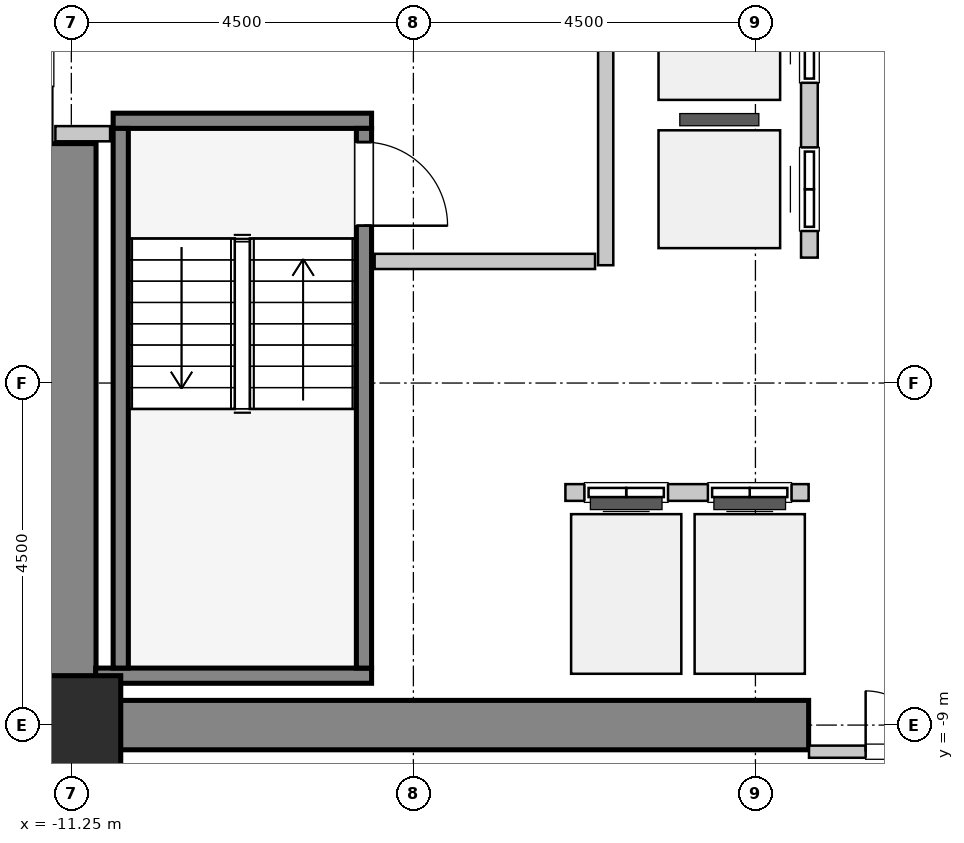
"""IFC4 building model, lengths in metres.
Left out: names, types, materials, properties, quantities, classifications, styles, units other than length and angle.
Written with IfcOpenShell. Run it as: python <this file> out.ifc"""

import sys

from ifc_helpers import new_model, si_unit, direction, frame, frame_2d, origin, origin_2d, place, context, subcontext, project, spatial, rectangle, hollow_rectangle, extrude, source, transform, mapped, element, fill, save


model = new_model("IFC4")
c1 = context("Model", 3, precision=1e-05, world=origin(), true_north=direction((0.0, 1.0)))
c2 = subcontext(c1, "Body", "Model", "MODEL_VIEW")
j1 = project(units=[si_unit("LENGTHUNIT", "METRE"), si_unit("PLANEANGLEUNIT", "RADIAN")], contexts=[c1])
p1 = place(None, origin())
s1 = spatial("IfcSite", under=j1, at=p1, CompositionType="ELEMENT")
p2 = place(p1, origin())
s2 = spatial("IfcBuilding", under=s1, at=p2, CompositionType="ELEMENT")
p3 = place(p2, origin())
s3 = spatial("IfcBuildingStorey", under=s2, at=p3, CompositionType="ELEMENT", Elevation=0.0)
m1 = source(origin(), c2, "Body", "SweptSolid", [
    extrude(rectangle(XDim=10.025, YDim=0.65, at=frame_2d((5.012, 0.0))), origin(), (0.0, 0.0, 1.0), 6.0),
])
p4 = place(p3, frame((-11.575, -9.0, 0.0), z_axis=(0.0, 0.0, 1.0), x_axis=(1.0, 0.0, 0.0)))
e1 = element("IfcWall", 1, at=p4, inside=s3, PredefinedType="SHEAR", context=c2, shape_type="MappedRepresentation", body=[
    mapped(m1, transform((0.0, 0.0, 0.0), x_axis=(1.0, 0.0, 0.0), y_axis=(0.0, 1.0, 0.0), z_axis=(0.0, 0.0, 1.0), scale=1.0)),
])
m2 = source(origin(), c2, "Body", "SweptSolid", [
    extrude(rectangle(XDim=7.325, YDim=0.65, at=frame_2d((3.663, 0.0))), origin(), (0.0, 0.0, 1.0), 6.0),
])
p5 = place(p3, frame((-11.25, -8.675, 0.0), z_axis=(0.0, 0.0, 1.0), x_axis=(0.0, 1.0, 0.0)))
e2 = element("IfcWall", 2, at=p5, inside=s3, PredefinedType="SHEAR", context=c2, shape_type="MappedRepresentation", body=[
    mapped(m2, transform((0.0, 0.0, 0.0), x_axis=(1.0, 0.0, 0.0), y_axis=(0.0, 1.0, 0.0), z_axis=(0.0, 0.0, 1.0), scale=1.0)),
])
m3 = source(origin(), c2, "Body", "SweptSolid", [
    extrude(hollow_rectangle(XDim=1.3, YDim=1.3, WallThickness=0.065, InnerFilletRadius=0.065, OuterFilletRadius=0.13, at=origin_2d()), origin(), (0.0, 0.0, 1.0), 6.0),
])
p6 = place(p3, frame((-11.25, -9.0, 0.0), z_axis=(0.0, 0.0, 1.0), x_axis=(1.0, 0.0, 0.0)))
e3 = element("IfcColumn", 3, at=p6, inside=s3, PredefinedType="COLUMN", context=c2, shape_type="MappedRepresentation", body=[
    mapped(m3, transform((0.0, 0.0, 0.0), x_axis=(1.0, 0.0, 0.0), y_axis=(0.0, 1.0, 0.0), z_axis=(0.0, 0.0, 1.0), scale=1.0)),
])
m4 = source(origin(), c2, "Body", "SweptSolid", [
    extrude(rectangle(XDim=3.4, YDim=0.2, at=frame_2d((1.7, 0.0))), origin(), (0.0, 0.0, 1.0), 6.0),
])
p7 = place(p3, frame((-10.7, -1.05, 0.0), z_axis=(0.0, 0.0, 1.0), x_axis=(1.0, 0.0, 0.0)))
e4 = element("IfcWall", 4, at=p7, inside=s3, PredefinedType="SOLIDWALL", context=c2, shape_type="MappedRepresentation", body=[
    mapped(m4, transform((0.0, 0.0, 0.0), x_axis=(1.0, 0.0, 0.0), y_axis=(0.0, 1.0, 0.0), z_axis=(0.0, 0.0, 1.0), scale=1.0)),
])
m5 = source(origin(), c2, "Body", "SweptSolid", [
    extrude(rectangle(XDim=3.63, YDim=0.2, at=frame_2d((1.815, 0.0))), origin(), (0.0, 0.0, 1.0), 6.0),
])
p8 = place(p3, frame((-10.93, -8.35, 0.0), z_axis=(0.0, 0.0, 1.0), x_axis=(1.0, 0.0, 0.0)))
e5 = element("IfcWall", 5, at=p8, inside=s3, PredefinedType="SOLIDWALL", context=c2, shape_type="MappedRepresentation", body=[
    mapped(m5, transform((0.0, 0.0, 0.0), x_axis=(1.0, 0.0, 0.0), y_axis=(0.0, 1.0, 0.0), z_axis=(0.0, 0.0, 1.0), scale=1.0)),
])
m6 = source(origin(), c2, "Body", "SweptSolid", [
    extrude(rectangle(XDim=7.1, YDim=0.2, at=frame_2d((3.55, 0.0))), origin(), (0.0, 0.0, 1.0), 6.0),
])
p9 = place(p3, frame((-10.6, -1.15, 0.0), z_axis=(0.0, 0.0, 1.0), x_axis=(0.0, -1.0, 0.0)))
e6 = element("IfcWall", 6, at=p9, inside=s3, PredefinedType="SOLIDWALL", context=c2, shape_type="MappedRepresentation", body=[
    mapped(m6, transform((0.0, 0.0, 0.0), x_axis=(1.0, 0.0, 0.0), y_axis=(0.0, 1.0, 0.0), z_axis=(0.0, 0.0, 1.0), scale=1.0)),
])
p10 = place(p3, frame((-7.4, -1.15, 0.0), z_axis=(0.0, 0.0, 1.0), x_axis=(0.0, -1.0, 0.0)))
e7 = element("IfcWall", 7, at=p10, inside=s3, PredefinedType="SOLIDWALL", context=c2, shape_type="MappedRepresentation", body=[
    mapped(m6, transform((0.0, 0.0, 0.0), x_axis=(1.0, 0.0, 0.0), y_axis=(0.0, 1.0, 0.0), z_axis=(0.0, 0.0, 1.0), scale=1.0)),
])
p11 = place(p10, frame((0.18, 0.0, 0.0)))
e8 = element("IfcOpeningElement", 8, at=p11, cuts=e7, PredefinedType="OPENING", context=c2, shape_type="SweptSolid", body=[
    extrude(rectangle(XDim=1.1, YDim=2.15, at=frame_2d((0.55, 1.075))), frame((0.0, 0.11, 0.0), z_axis=(0.0, -1.0, 0.0), x_axis=(1.0, 0.0, 0.0)), (0.0, 0.0, 1.0), 0.22),
])
m7 = source(origin(), c2, "Body", "SweptSolid", [
    extrude(rectangle(XDim=3.2, YDim=0.22, at=frame_2d((1.6, 0.0))), origin(), (0.0, 0.0, 1.0), 5.685),
])
p12 = place(p3, frame((-1.55, -5.94, 0.0), z_axis=(0.0, 0.0, 1.0), x_axis=(-1.0, 0.0, 0.0)))
e9 = element("IfcWall", 9, at=p12, inside=s3, PredefinedType="SOLIDWALL", context=c2, shape_type="MappedRepresentation", body=[
    mapped(m7, transform((0.0, 0.0, 0.0), x_axis=(1.0, 0.0, 0.0), y_axis=(0.0, 1.0, 0.0), z_axis=(0.0, 0.0, 1.0), scale=1.0)),
])
p13 = place(p12, frame((1.85, 0.0, 0.0)))
e10 = element("IfcOpeningElement", 10, at=p13, cuts=e9, PredefinedType="OPENING", context=c2, shape_type="SweptSolid", body=[
    extrude(rectangle(XDim=1.1, YDim=2.2, at=frame_2d((0.55, 1.1))), frame((0.0, 0.12, 0.0), z_axis=(0.0, -1.0, 0.0), x_axis=(1.0, 0.0, 0.0)), (0.0, 0.0, 1.0), 0.24),
])
p14 = place(p12, frame((0.225, 0.0, 0.0)))
e11 = element("IfcOpeningElement", 11, at=p14, cuts=e9, PredefinedType="OPENING", context=c2, shape_type="SweptSolid", body=[
    extrude(rectangle(XDim=1.1, YDim=2.2, at=frame_2d((0.55, 1.1))), frame((0.0, 0.12, 0.0), z_axis=(0.0, -1.0, 0.0), x_axis=(1.0, 0.0, 0.0)), (0.0, 0.0, 1.0), 0.24),
])
m8 = source(origin(), c2, "Body", "SweptSolid", [
    extrude(rectangle(XDim=5.7, YDim=0.22, at=frame_2d((2.85, 0.0))), origin(), (0.0, 0.0, 1.0), 5.685),
])
p15 = place(p3, frame((-1.54, -2.85, 0.0), z_axis=(0.0, 0.0, 1.0), x_axis=(0.0, 1.0, 0.0)))
e12 = element("IfcWall", 12, at=p15, inside=s3, PredefinedType="SOLIDWALL", context=c2, shape_type="MappedRepresentation", body=[
    mapped(m8, transform((0.0, 0.0, 0.0), x_axis=(1.0, 0.0, 0.0), y_axis=(0.0, 1.0, 0.0), z_axis=(0.0, 0.0, 1.0), scale=1.0)),
])
p16 = place(p15, frame((0.35, 0.0, 0.0)))
e13 = element("IfcOpeningElement", 13, at=p16, cuts=e12, PredefinedType="OPENING", context=c2, shape_type="SweptSolid", body=[
    extrude(rectangle(XDim=1.1, YDim=2.2, at=frame_2d((0.55, 1.1))), frame((0.0, 0.12, 0.0), z_axis=(0.0, -1.0, 0.0), x_axis=(1.0, 0.0, 0.0)), (0.0, 0.0, 1.0), 0.24),
])
p17 = place(p15, frame((2.3, 0.0, 0.0)))
e14 = element("IfcOpeningElement", 14, at=p17, cuts=e12, PredefinedType="OPENING", context=c2, shape_type="SweptSolid", body=[
    extrude(rectangle(XDim=1.1, YDim=2.2, at=frame_2d((0.55, 1.1))), frame((0.0, 0.12, 0.0), z_axis=(0.0, -1.0, 0.0), x_axis=(1.0, 0.0, 0.0)), (0.0, 0.0, 1.0), 0.24),
])
p18 = place(p15, frame((4.25, 0.0, 0.0)))
e15 = element("IfcOpeningElement", 15, at=p18, cuts=e12, PredefinedType="OPENING", context=c2, shape_type="SweptSolid", body=[
    extrude(rectangle(XDim=1.1, YDim=2.2, at=frame_2d((0.55, 1.1))), frame((0.0, 0.12, 0.0), z_axis=(0.0, -1.0, 0.0), x_axis=(1.0, 0.0, 0.0)), (0.0, 0.0, 1.0), 0.24),
])
m9 = source(origin(), c2, "Body", "SweptSolid", [
    extrude(rectangle(XDim=5.9, YDim=0.2, at=frame_2d((2.95, 0.0))), origin(), (0.0, 0.0, 1.0), 5.685),
])
p19 = place(p3, frame((-4.22, -2.95, 0.0), z_axis=(0.0, 0.0, 1.0), x_axis=(0.0, 1.0, 0.0)))
e16 = element("IfcWall", 16, at=p19, inside=s3, PredefinedType="PARTITIONING", context=c2, shape_type="MappedRepresentation", body=[
    mapped(m9, transform((0.0, 0.0, 0.0), x_axis=(1.0, 0.0, 0.0), y_axis=(0.0, 1.0, 0.0), z_axis=(0.0, 0.0, 1.0), scale=1.0)),
])
m10 = source(origin(), c2, "Body", "SweptSolid", [
    extrude(rectangle(XDim=2.9, YDim=0.2, at=frame_2d((1.45, 0.0))), origin(), (0.0, 0.0, 1.0), 5.685),
])
p20 = place(p3, frame((-7.26, -2.9, 0.0), z_axis=(0.0, 0.0, 1.0), x_axis=(1.0, 0.0, 0.0)))
e17 = element("IfcWall", 17, at=p20, inside=s3, PredefinedType="PARTITIONING", context=c2, shape_type="MappedRepresentation", body=[
    mapped(m10, transform((0.0, 0.0, 0.0), x_axis=(1.0, 0.0, 0.0), y_axis=(0.0, 1.0, 0.0), z_axis=(0.0, 0.0, 1.0), scale=1.0)),
])
m11 = source(origin(), c2, "Body", "SweptSolid", [
    extrude(rectangle(XDim=0.72, YDim=0.2, at=frame_2d((0.36, 0.0))), origin(), (0.0, 0.0, 1.0), 5.685),
])
p21 = place(p3, frame((-11.46, -1.22, 0.0), z_axis=(0.0, 0.0, 1.0), x_axis=(1.0, 0.0, 0.0)))
e18 = element("IfcWall", 18, at=p21, inside=s3, PredefinedType="PARTITIONING", context=c2, shape_type="MappedRepresentation", body=[
    mapped(m11, transform((0.0, 0.0, 0.0), x_axis=(1.0, 0.0, 0.0), y_axis=(0.0, 1.0, 0.0), z_axis=(0.0, 0.0, 1.0), scale=1.0)),
])
m12 = source(origin(), c2, "Body", "SweptSolid", [
    extrude(rectangle(XDim=3.09, YDim=0.16, at=frame_2d((1.545, 0.0))), origin(), (0.0, 0.0, 1.0), 4.575),
])
p22 = place(p3, frame((-1.545, -9.35, 0.0), z_axis=(0.0, 0.0, 1.0), x_axis=(1.0, 0.0, 0.0)))
e19 = element("IfcWall", 19, at=p22, inside=s3, PredefinedType="PARTITIONING", context=c2, shape_type="MappedRepresentation", body=[
    mapped(m12, transform((0.0, 0.0, 0.0), x_axis=(1.0, 0.0, 0.0), y_axis=(0.0, 1.0, 0.0), z_axis=(0.0, 0.0, 1.0), scale=1.0)),
])
p23 = place(p22, frame((0.745, 0.0, 0.0)))
e20 = element("IfcOpeningElement", 20, at=p23, cuts=e19, PredefinedType="OPENING", context=c2, shape_type="SweptSolid", body=[
    extrude(rectangle(XDim=1.6, YDim=2.3, at=frame_2d((0.8, 1.15))), frame((0.0, 0.09, 0.0), z_axis=(0.0, -1.0, 0.0), x_axis=(1.0, 0.0, 0.0)), (0.0, 0.0, 1.0), 0.18),
])
m13 = source(origin(), c2, "Body", "SweptSolid", [
    extrude(rectangle(XDim=1.1, YDim=2.15, at=frame_2d((0.55, 1.075))), frame((0.0, 0.025, 0.0), z_axis=(0.0, -1.0, 0.0), x_axis=(1.0, 0.0, 0.0)), (0.0, 0.0, 1.0), 0.05),
])
p24 = place(p11, origin())
e21 = element("IfcDoor", 21, at=p24, inside=s3, OperationType="SINGLE_SWING_RIGHT", PredefinedType="DOOR", context=c2, shape_type="MappedRepresentation", body=[
    mapped(m13, transform((0.0, 0.0, 0.0), x_axis=(1.0, 0.0, 0.0), y_axis=(0.0, 1.0, 0.0), z_axis=(0.0, 0.0, 1.0), scale=1.0)),
])
fill(e8, e21)
m14 = source(origin(), c2, "Body", "SweptSolid", [
    extrude(rectangle(XDim=1.1, YDim=2.2, at=frame_2d((0.55, 1.1))), frame((0.0, 0.025, 0.0), z_axis=(0.0, -1.0, 0.0), x_axis=(1.0, 0.0, 0.0)), (0.0, 0.0, 1.0), 0.05),
])
p25 = place(p13, origin())
e22 = element("IfcDoor", 22, at=p25, inside=s3, OperationType="DOUBLE_DOOR_SLIDING", PredefinedType="DOOR", context=c2, shape_type="MappedRepresentation", body=[
    mapped(m14, transform((0.0, 0.0, 0.0), x_axis=(1.0, 0.0, 0.0), y_axis=(0.0, 1.0, 0.0), z_axis=(0.0, 0.0, 1.0), scale=1.0)),
])
fill(e10, e22)
p26 = place(p14, origin())
e23 = element("IfcDoor", 23, at=p26, inside=s3, OperationType="DOUBLE_DOOR_SLIDING", PredefinedType="DOOR", context=c2, shape_type="MappedRepresentation", body=[
    mapped(m14, transform((0.0, 0.0, 0.0), x_axis=(1.0, 0.0, 0.0), y_axis=(0.0, 1.0, 0.0), z_axis=(0.0, 0.0, 1.0), scale=1.0)),
])
fill(e11, e23)
p27 = place(p16, origin())
e24 = element("IfcDoor", 24, at=p27, inside=s3, OperationType="DOUBLE_DOOR_SLIDING", PredefinedType="DOOR", context=c2, shape_type="MappedRepresentation", body=[
    mapped(m14, transform((0.0, 0.0, 0.0), x_axis=(1.0, 0.0, 0.0), y_axis=(0.0, 1.0, 0.0), z_axis=(0.0, 0.0, 1.0), scale=1.0)),
])
fill(e13, e24)
p28 = place(p17, origin())
e25 = element("IfcDoor", 25, at=p28, inside=s3, OperationType="DOUBLE_DOOR_SLIDING", PredefinedType="DOOR", context=c2, shape_type="MappedRepresentation", body=[
    mapped(m14, transform((0.0, 0.0, 0.0), x_axis=(1.0, 0.0, 0.0), y_axis=(0.0, 1.0, 0.0), z_axis=(0.0, 0.0, 1.0), scale=1.0)),
])
fill(e14, e25)
m15 = source(origin(), c2, "Body", "SweptSolid", [
    extrude(rectangle(XDim=1.6, YDim=2.3, at=frame_2d((0.8, 1.15))), frame((0.0, 0.025, 0.0), z_axis=(0.0, -1.0, 0.0), x_axis=(1.0, 0.0, 0.0)), (0.0, 0.0, 1.0), 0.05),
])
p29 = place(p23, origin())
e26 = element("IfcDoor", 26, at=p29, inside=s3, OperationType="DOUBLE_DOOR_SINGLE_SWING", PredefinedType="DOOR", context=c2, shape_type="MappedRepresentation", body=[
    mapped(m15, transform((0.0, 0.0, 0.0), x_axis=(1.0, 0.0, 0.0), y_axis=(0.0, 1.0, 0.0), z_axis=(0.0, 0.0, 1.0), scale=1.0)),
])
fill(e20, e26)
save(model, sys.argv[1])
